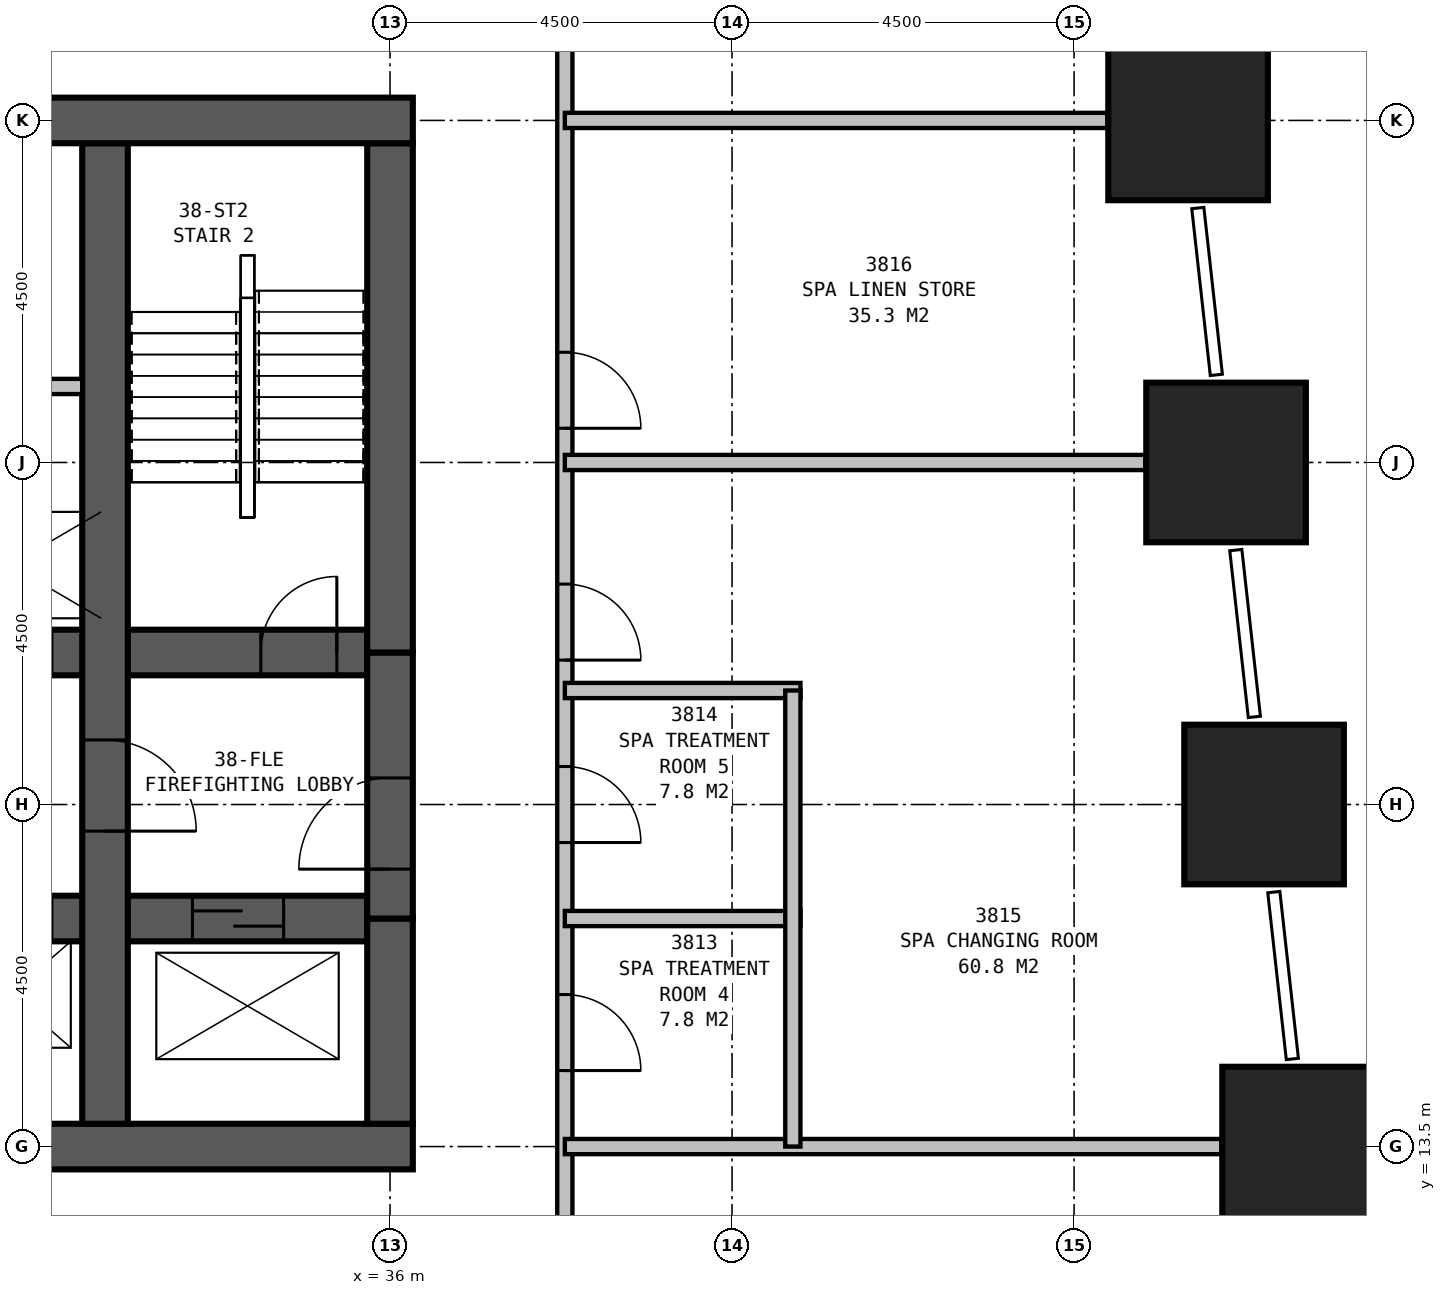
"""IFC4 building model, lengths in metres.
Left out: names, types, materials, properties, quantities, classifications, styles, units other than length and angle.
Written with IfcOpenShell. Run it as: python <this file> out.ifc"""

import sys

from ifc_helpers import new_model, si_unit, direction, frame, frame_2d, origin, origin_2d, place, context, subcontext, project, spatial, rectangle, extrude, element, fill, save


model = new_model("IFC4")
c1 = context("Model", 3, precision=1e-05, world=origin(), true_north=direction((0.0, 1.0)))
c2 = subcontext(c1, "Body", "Model", "MODEL_VIEW")
j1 = project(units=[si_unit("LENGTHUNIT", "METRE"), si_unit("PLANEANGLEUNIT", "RADIAN")], contexts=[c1])
p1 = place(None, origin())
s1 = spatial("IfcSite", under=j1, at=p1, CompositionType="ELEMENT")
p2 = place(p1, origin())
s2 = spatial("IfcBuilding", under=s1, at=p2, CompositionType="ELEMENT")
p3 = place(p2, frame((0.0, 0.0, 145.9)))
s3 = spatial("IfcBuildingStorey", under=s2, at=p3, CompositionType="ELEMENT", Elevation=145.9)
for number, where, z_axis, x_axis in (
    (1, (48.0, 13.5, 0.0), (0.0, 0.0, 1.0), (1.0, 0.0, 0.0)),
    (2, (47.5, 18.0, 0.0), (0.0, 0.0, 1.0), (1.0, 0.0, 0.0)),
    (3, (47.0, 22.5, 0.0), (0.0, 0.0, 1.0), (1.0, 0.0, 0.0)),
    (4, (46.5, 27.0, 0.0), (0.0, 0.0, 1.0), (1.0, 0.0, 0.0)),
):
    element("IfcColumn", number, at=place(p3, frame(where, z_axis=z_axis, x_axis=x_axis)), inside=s3, PredefinedType="COLUMN", context=c2, shape_type="SweptSolid", body=[
        extrude(rectangle(XDim=2.1, YDim=2.1, at=origin_2d()), origin(), (0.0, 0.0, 1.0), 6.0),
    ])
p4 = place(p3, frame((13.2, 13.5, 0.0), z_axis=(0.0, 0.0, 1.0), x_axis=(1.0, 0.0, 0.0)))
e5 = element("IfcWall", 5, at=p4, inside=s3, PredefinedType="SHEAR", context=c2, shape_type="SweptSolid", body=[
    extrude(rectangle(XDim=23.1, YDim=0.6, at=frame_2d((11.55, 0.0))), origin(), (0.0, 0.0, 1.0), 6.0),
])
p5 = place(p3, frame((36.3, 27.0, 0.0), z_axis=(0.0, 0.0, 1.0), x_axis=(-1.0, 0.0, 0.0)))
e6 = element("IfcWall", 6, at=p5, inside=s3, PredefinedType="SHEAR", context=c2, shape_type="SweptSolid", body=[
    extrude(rectangle(XDim=23.1, YDim=0.6, at=frame_2d((11.55, 0.0))), origin(), (0.0, 0.0, 1.0), 6.0),
])
p6 = place(p5, frame((17.05, 0.0, 0.0)))
e7 = element("IfcOpeningElement", 7, at=p6, cuts=e6, PredefinedType="OPENING", context=c2, shape_type="SweptSolid", body=[
    extrude(rectangle(XDim=1.0, YDim=2.1, at=frame_2d((0.5, 1.05))), frame((0.0, 0.31, 0.0), z_axis=(0.0, -1.0, 0.0), x_axis=(1.0, 0.0, 0.0)), (0.0, 0.0, 1.0), 0.62),
])
p7 = place(p5, frame((12.05, 0.0, 0.0)))
e8 = element("IfcOpeningElement", 8, at=p7, cuts=e6, PredefinedType="OPENING", context=c2, shape_type="SweptSolid", body=[
    extrude(rectangle(XDim=1.0, YDim=2.1, at=frame_2d((0.5, 1.05))), frame((0.0, 0.31, 0.0), z_axis=(0.0, -1.0, 0.0), x_axis=(1.0, 0.0, 0.0)), (0.0, 0.0, 1.0), 0.62),
])
p8 = place(p5, frame((7.05, 0.0, 0.0)))
e9 = element("IfcOpeningElement", 9, at=p8, cuts=e6, PredefinedType="OPENING", context=c2, shape_type="SweptSolid", body=[
    extrude(rectangle(XDim=1.0, YDim=2.1, at=frame_2d((0.5, 1.05))), frame((0.0, 0.31, 0.0), z_axis=(0.0, -1.0, 0.0), x_axis=(1.0, 0.0, 0.0)), (0.0, 0.0, 1.0), 0.62),
])
p9 = place(p3, frame((32.25, 13.8, 0.0), z_axis=(0.0, 0.0, 1.0), x_axis=(0.0, 1.0, 0.0)))
e10 = element("IfcWall", 10, at=p9, inside=s3, PredefinedType="SHEAR", context=c2, shape_type="SweptSolid", body=[
    extrude(rectangle(XDim=12.9, YDim=0.6, at=frame_2d((6.45, 0.0))), origin(), (0.0, 0.0, 1.0), 6.0),
])
p10 = place(p9, frame((5.05, 0.0, 0.0), z_axis=(0.0, 0.0, 1.0), x_axis=(-1.0, 0.0, 0.0)))
e11 = element("IfcOpeningElement", 11, at=p10, cuts=e10, PredefinedType="OPENING", context=c2, shape_type="SweptSolid", body=[
    extrude(rectangle(XDim=1.2, YDim=2.1, at=frame_2d((0.6, 1.05))), frame((0.0, 0.31, 0.0), z_axis=(0.0, -1.0, 0.0), x_axis=(1.0, 0.0, 0.0)), (0.0, 0.0, 1.0), 0.62),
])
p11 = place(p3, frame((13.8, 16.5, 0.0), z_axis=(0.0, 0.0, 1.0), x_axis=(1.0, 0.0, 0.0)))
e12 = element("IfcWall", 12, at=p11, inside=s3, PredefinedType="SHEAR", context=c2, shape_type="SweptSolid", body=[
    extrude(rectangle(XDim=21.9, YDim=0.6, at=frame_2d((10.95, 0.0))), origin(), (0.0, 0.0, 1.0), 6.0),
])
p12 = place(p11, frame((11.65, 0.0, 0.0)))
e13 = element("IfcOpeningElement", 13, at=p12, cuts=e12, PredefinedType="OPENING", context=c2, shape_type="SweptSolid", body=[
    extrude(rectangle(XDim=1.1, YDim=2.1, at=frame_2d((0.55, 1.05))), frame((0.0, 0.31, 0.0), z_axis=(0.0, -1.0, 0.0), x_axis=(1.0, 0.0, 0.0)), (0.0, 0.0, 1.0), 0.62),
])
p13 = place(p11, frame((14.15, 0.0, 0.0)))
e14 = element("IfcOpeningElement", 14, at=p13, cuts=e12, PredefinedType="OPENING", context=c2, shape_type="SweptSolid", body=[
    extrude(rectangle(XDim=1.1, YDim=2.1, at=frame_2d((0.55, 1.05))), frame((0.0, 0.31, 0.0), z_axis=(0.0, -1.0, 0.0), x_axis=(1.0, 0.0, 0.0)), (0.0, 0.0, 1.0), 0.62),
])
p14 = place(p11, frame((16.65, 0.0, 0.0)))
e15 = element("IfcOpeningElement", 15, at=p14, cuts=e12, PredefinedType="OPENING", context=c2, shape_type="SweptSolid", body=[
    extrude(rectangle(XDim=1.1, YDim=2.1, at=frame_2d((0.55, 1.05))), frame((0.0, 0.31, 0.0), z_axis=(0.0, -1.0, 0.0), x_axis=(1.0, 0.0, 0.0)), (0.0, 0.0, 1.0), 0.62),
])
p15 = place(p11, frame((5.75, 0.0, 0.0), z_axis=(0.0, 0.0, 1.0), x_axis=(-1.0, 0.0, 0.0)))
e16 = element("IfcOpeningElement", 16, at=p15, cuts=e12, PredefinedType="OPENING", context=c2, shape_type="SweptSolid", body=[
    extrude(rectangle(XDim=1.0, YDim=2.1, at=frame_2d((0.5, 1.05))), frame((0.0, 0.31, 0.0), z_axis=(0.0, -1.0, 0.0), x_axis=(1.0, 0.0, 0.0)), (0.0, 0.0, 1.0), 0.62),
])
p16 = place(p11, frame((10.2, 0.0, 0.0), z_axis=(0.0, 0.0, 1.0), x_axis=(-1.0, 0.0, 0.0)))
e17 = element("IfcOpeningElement", 17, at=p16, cuts=e12, PredefinedType="OPENING", context=c2, shape_type="SweptSolid", body=[
    extrude(rectangle(XDim=1.0, YDim=2.1, at=frame_2d((0.5, 1.05))), frame((0.0, 0.31, 0.0), z_axis=(0.0, -1.0, 0.0), x_axis=(1.0, 0.0, 0.0)), (0.0, 0.0, 1.0), 0.62),
])
p17 = place(p11, frame((0.6, 0.0, 0.0)))
e18 = element("IfcOpeningElement", 18, at=p17, cuts=e12, PredefinedType="OPENING", context=c2, shape_type="SweptSolid", body=[
    extrude(rectangle(XDim=1.2, YDim=2.1, at=frame_2d((0.6, 1.05))), frame((0.0, 0.31, 0.0), z_axis=(0.0, -1.0, 0.0), x_axis=(1.0, 0.0, 0.0)), (0.0, 0.0, 1.0), 0.62),
])
p18 = place(p11, frame((19.6, 0.0, 0.0)))
e19 = element("IfcOpeningElement", 19, at=p18, cuts=e12, PredefinedType="OPENING", context=c2, shape_type="SweptSolid", body=[
    extrude(rectangle(XDim=1.2, YDim=2.1, at=frame_2d((0.6, 1.05))), frame((0.0, 0.31, 0.0), z_axis=(0.0, -1.0, 0.0), x_axis=(1.0, 0.0, 0.0)), (0.0, 0.0, 1.0), 0.62),
])
p19 = place(p3, frame((13.8, 20.0, 0.0), z_axis=(0.0, 0.0, 1.0), x_axis=(1.0, 0.0, 0.0)))
e20 = element("IfcWall", 20, at=p19, inside=s3, PredefinedType="SHEAR", context=c2, shape_type="SweptSolid", body=[
    extrude(rectangle(XDim=21.9, YDim=0.6, at=frame_2d((10.95, 0.0))), origin(), (0.0, 0.0, 1.0), 6.0),
])
p20 = place(p19, frame((0.5, 0.0, 0.0)))
e21 = element("IfcOpeningElement", 21, at=p20, cuts=e20, PredefinedType="OPENING", context=c2, shape_type="SweptSolid", body=[
    extrude(rectangle(XDim=1.0, YDim=2.1, at=frame_2d((0.5, 1.05))), frame((0.0, 0.31, 0.0), z_axis=(0.0, -1.0, 0.0), x_axis=(1.0, 0.0, 0.0)), (0.0, 0.0, 1.0), 0.62),
])
p21 = place(p19, frame((20.5, 0.0, 0.0)))
e22 = element("IfcOpeningElement", 22, at=p21, cuts=e20, PredefinedType="OPENING", context=c2, shape_type="SweptSolid", body=[
    extrude(rectangle(XDim=1.0, YDim=2.1, at=frame_2d((0.5, 1.05))), frame((0.0, 0.31, 0.0), z_axis=(0.0, -1.0, 0.0), x_axis=(1.0, 0.0, 0.0)), (0.0, 0.0, 1.0), 0.62),
])
p22 = place(p19, frame((4.15, 0.0, 0.0)))
e23 = element("IfcOpeningElement", 23, at=p22, cuts=e20, PredefinedType="OPENING", context=c2, shape_type="SweptSolid", body=[
    extrude(rectangle(XDim=1.1, YDim=2.1, at=frame_2d((0.55, 1.05))), frame((0.0, 0.31, 0.0), z_axis=(0.0, -1.0, 0.0), x_axis=(1.0, 0.0, 0.0)), (0.0, 0.0, 1.0), 0.62),
])
p23 = place(p19, frame((6.65, 0.0, 0.0)))
e24 = element("IfcOpeningElement", 24, at=p23, cuts=e20, PredefinedType="OPENING", context=c2, shape_type="SweptSolid", body=[
    extrude(rectangle(XDim=1.1, YDim=2.1, at=frame_2d((0.55, 1.05))), frame((0.0, 0.31, 0.0), z_axis=(0.0, -1.0, 0.0), x_axis=(1.0, 0.0, 0.0)), (0.0, 0.0, 1.0), 0.62),
])
p24 = place(p19, frame((9.15, 0.0, 0.0)))
e25 = element("IfcOpeningElement", 25, at=p24, cuts=e20, PredefinedType="OPENING", context=c2, shape_type="SweptSolid", body=[
    extrude(rectangle(XDim=1.1, YDim=2.1, at=frame_2d((0.55, 1.05))), frame((0.0, 0.31, 0.0), z_axis=(0.0, -1.0, 0.0), x_axis=(1.0, 0.0, 0.0)), (0.0, 0.0, 1.0), 0.62),
])
p25 = place(p19, frame((11.65, 0.0, 0.0)))
e26 = element("IfcOpeningElement", 26, at=p25, cuts=e20, PredefinedType="OPENING", context=c2, shape_type="SweptSolid", body=[
    extrude(rectangle(XDim=1.1, YDim=2.1, at=frame_2d((0.55, 1.05))), frame((0.0, 0.31, 0.0), z_axis=(0.0, -1.0, 0.0), x_axis=(1.0, 0.0, 0.0)), (0.0, 0.0, 1.0), 0.62),
])
p26 = place(p19, frame((14.15, 0.0, 0.0)))
e27 = element("IfcOpeningElement", 27, at=p26, cuts=e20, PredefinedType="OPENING", context=c2, shape_type="SweptSolid", body=[
    extrude(rectangle(XDim=1.1, YDim=2.1, at=frame_2d((0.55, 1.05))), frame((0.0, 0.31, 0.0), z_axis=(0.0, -1.0, 0.0), x_axis=(1.0, 0.0, 0.0)), (0.0, 0.0, 1.0), 0.62),
])
p27 = place(p19, frame((16.65, 0.0, 0.0)))
e28 = element("IfcOpeningElement", 28, at=p27, cuts=e20, PredefinedType="OPENING", context=c2, shape_type="SweptSolid", body=[
    extrude(rectangle(XDim=1.1, YDim=2.1, at=frame_2d((0.55, 1.05))), frame((0.0, 0.31, 0.0), z_axis=(0.0, -1.0, 0.0), x_axis=(1.0, 0.0, 0.0)), (0.0, 0.0, 1.0), 0.62),
])
p28 = place(p3, frame((36.0, 13.8, 0.0), z_axis=(0.0, 0.0, 1.0), x_axis=(0.0, 1.0, 0.0)))
e29 = element("IfcWall", 29, at=p28, inside=s3, PredefinedType="SHEAR", context=c2, shape_type="SweptSolid", body=[
    extrude(rectangle(XDim=2.7, YDim=0.6, at=frame_2d((1.35, 0.0))), origin(), (0.0, 0.0, 1.0), 6.0),
])
p29 = place(p3, frame((36.0, 16.5, 0.0), z_axis=(0.0, 0.0, 1.0), x_axis=(0.0, 1.0, 0.0)))
e30 = element("IfcWall", 30, at=p29, inside=s3, PredefinedType="SHEAR", context=c2, shape_type="SweptSolid", body=[
    extrude(rectangle(XDim=3.5, YDim=0.6, at=frame_2d((1.75, 0.0))), origin(), (0.0, 0.0, 1.0), 6.0),
])
p30 = place(p29, frame((0.65, 0.0, 0.0)))
e31 = element("IfcOpeningElement", 31, at=p30, cuts=e30, PredefinedType="OPENING", context=c2, shape_type="SweptSolid", body=[
    extrude(rectangle(XDim=1.2, YDim=2.1, at=frame_2d((0.6, 1.05))), frame((0.0, 0.31, 0.0), z_axis=(0.0, -1.0, 0.0), x_axis=(1.0, 0.0, 0.0)), (0.0, 0.0, 1.0), 0.62),
])
p31 = place(p3, frame((36.0, 20.0, 0.0), z_axis=(0.0, 0.0, 1.0), x_axis=(0.0, 1.0, 0.0)))
e32 = element("IfcWall", 32, at=p31, inside=s3, PredefinedType="SHEAR", context=c2, shape_type="SweptSolid", body=[
    extrude(rectangle(XDim=6.7, YDim=0.6, at=frame_2d((3.35, 0.0))), origin(), (0.0, 0.0, 1.0), 6.0),
])
p32 = place(p3, frame((38.3, 11.2, 0.0), z_axis=(0.0, 0.0, 1.0), x_axis=(0.0, 1.0, 0.0)))
e33 = element("IfcWall", 33, at=p32, inside=s3, PredefinedType="PARTITIONING", context=c2, shape_type="SweptSolid", body=[
    extrude(rectangle(XDim=18.1, YDim=0.2, at=frame_2d((9.05, 0.0))), origin(), (0.0, 0.0, 1.0), 5.7),
])
p33 = place(p32, frame((4.3, 0.0, 0.0), z_axis=(0.0, 0.0, 1.0), x_axis=(-1.0, 0.0, 0.0)))
e34 = element("IfcOpeningElement", 34, at=p33, cuts=e33, PredefinedType="OPENING", context=c2, shape_type="SweptSolid", body=[
    extrude(rectangle(XDim=1.0, YDim=2.1, at=frame_2d((0.5, 1.05))), frame((0.0, 0.11, 0.0), z_axis=(0.0, -1.0, 0.0), x_axis=(1.0, 0.0, 0.0)), (0.0, 0.0, 1.0), 0.22),
])
p34 = place(p32, frame((7.3, 0.0, 0.0), z_axis=(0.0, 0.0, 1.0), x_axis=(-1.0, 0.0, 0.0)))
e35 = element("IfcOpeningElement", 35, at=p34, cuts=e33, PredefinedType="OPENING", context=c2, shape_type="SweptSolid", body=[
    extrude(rectangle(XDim=1.0, YDim=2.1, at=frame_2d((0.5, 1.05))), frame((0.0, 0.11, 0.0), z_axis=(0.0, -1.0, 0.0), x_axis=(1.0, 0.0, 0.0)), (0.0, 0.0, 1.0), 0.22),
])
p35 = place(p32, frame((9.7, 0.0, 0.0), z_axis=(0.0, 0.0, 1.0), x_axis=(-1.0, 0.0, 0.0)))
e36 = element("IfcOpeningElement", 36, at=p35, cuts=e33, PredefinedType="OPENING", context=c2, shape_type="SweptSolid", body=[
    extrude(rectangle(XDim=1.0, YDim=2.1, at=frame_2d((0.5, 1.05))), frame((0.0, 0.11, 0.0), z_axis=(0.0, -1.0, 0.0), x_axis=(1.0, 0.0, 0.0)), (0.0, 0.0, 1.0), 0.22),
])
p36 = place(p32, frame((12.75, 0.0, 0.0), z_axis=(0.0, 0.0, 1.0), x_axis=(-1.0, 0.0, 0.0)))
e37 = element("IfcOpeningElement", 37, at=p36, cuts=e33, PredefinedType="OPENING", context=c2, shape_type="SweptSolid", body=[
    extrude(rectangle(XDim=1.0, YDim=2.1, at=frame_2d((0.5, 1.05))), frame((0.0, 0.11, 0.0), z_axis=(0.0, -1.0, 0.0), x_axis=(1.0, 0.0, 0.0)), (0.0, 0.0, 1.0), 0.22),
])
p37 = place(p3, frame((38.3, 13.5, 0.0), z_axis=(0.0, 0.0, 1.0), x_axis=(1.0, 0.0, 0.0)))
e38 = element("IfcWall", 38, at=p37, inside=s3, PredefinedType="PARTITIONING", context=c2, shape_type="SweptSolid", body=[
    extrude(rectangle(XDim=8.639, YDim=0.2, at=frame_2d((4.32, 0.0))), origin(), (0.0, 0.0, 1.0), 4.4),
])
p38 = place(p3, frame((38.3, 22.5, 0.0), z_axis=(0.0, 0.0, 1.0), x_axis=(1.0, 0.0, 0.0)))
e39 = element("IfcWall", 39, at=p38, inside=s3, PredefinedType="PARTITIONING", context=c2, shape_type="SweptSolid", body=[
    extrude(rectangle(XDim=7.639, YDim=0.2, at=frame_2d((3.82, 0.0))), origin(), (0.0, 0.0, 1.0), 4.7),
])
p39 = place(p3, frame((38.3, 27.0, 0.0), z_axis=(0.0, 0.0, 1.0), x_axis=(1.0, 0.0, 0.0)))
e40 = element("IfcWall", 40, at=p39, inside=s3, PredefinedType="PARTITIONING", context=c2, shape_type="SweptSolid", body=[
    extrude(rectangle(XDim=7.139, YDim=0.2, at=frame_2d((3.57, 0.0))), origin(), (0.0, 0.0, 1.0), 4.4),
])
for number, where, z_axis, x_axis in (
    (41, (38.3, 16.5, 0.0), (0.0, 0.0, 1.0), (1.0, 0.0, 0.0)),
    (42, (38.3, 19.5, 0.0), (0.0, 0.0, 1.0), (1.0, 0.0, 0.0)),
):
    element("IfcWall", number, at=place(p3, frame(where, z_axis=z_axis, x_axis=x_axis)), inside=s3, PredefinedType="PARTITIONING", context=c2, shape_type="SweptSolid", body=[
        extrude(rectangle(XDim=3.1, YDim=0.2, at=frame_2d((1.55, 0.0))), origin(), (0.0, 0.0, 1.0), 5.7),
    ])
p40 = place(p3, frame((41.3, 13.5, 0.0), z_axis=(0.0, 0.0, 1.0), x_axis=(0.0, 1.0, 0.0)))
e43 = element("IfcWall", 43, at=p40, inside=s3, PredefinedType="PARTITIONING", context=c2, shape_type="SweptSolid", body=[
    extrude(rectangle(XDim=6.0, YDim=0.2, at=frame_2d((3.0, 0.0))), origin(), (0.0, 0.0, 1.0), 5.7),
])
p41 = place(p3, frame((17.55, 23.5, 0.0), z_axis=(0.0, 0.0, 1.0), x_axis=(1.0, 0.0, 0.0)))
e44 = element("IfcWall", 44, at=p41, inside=s3, PredefinedType="PARTITIONING", context=c2, shape_type="SweptSolid", body=[
    extrude(rectangle(XDim=14.4, YDim=0.2, at=frame_2d((7.2, 0.0))), origin(), (0.0, 0.0, 1.0), 5.7),
])
p42 = place(p33, origin())
e45 = element("IfcDoor", 45, at=p42, inside=s3, OperationType="SINGLE_SWING_RIGHT", PredefinedType="DOOR", context=c2, shape_type="SweptSolid", body=[
    extrude(rectangle(XDim=1.0, YDim=2.1, at=frame_2d((0.5, 1.05))), frame((0.0, 0.025, 0.0), z_axis=(0.0, -1.0, 0.0), x_axis=(1.0, 0.0, 0.0)), (0.0, 0.0, 1.0), 0.05),
])
fill(e34, e45)
p43 = place(p34, origin())
e46 = element("IfcDoor", 46, at=p43, inside=s3, OperationType="SINGLE_SWING_RIGHT", PredefinedType="DOOR", context=c2, shape_type="SweptSolid", body=[
    extrude(rectangle(XDim=1.0, YDim=2.1, at=frame_2d((0.5, 1.05))), frame((0.0, 0.025, 0.0), z_axis=(0.0, -1.0, 0.0), x_axis=(1.0, 0.0, 0.0)), (0.0, 0.0, 1.0), 0.05),
])
fill(e35, e46)
p44 = place(p35, origin())
e47 = element("IfcDoor", 47, at=p44, inside=s3, OperationType="SINGLE_SWING_RIGHT", PredefinedType="DOOR", context=c2, shape_type="SweptSolid", body=[
    extrude(rectangle(XDim=1.0, YDim=2.1, at=frame_2d((0.5, 1.05))), frame((0.0, 0.025, 0.0), z_axis=(0.0, -1.0, 0.0), x_axis=(1.0, 0.0, 0.0)), (0.0, 0.0, 1.0), 0.05),
])
fill(e36, e47)
p45 = place(p36, origin())
e48 = element("IfcDoor", 48, at=p45, inside=s3, OperationType="SINGLE_SWING_RIGHT", PredefinedType="DOOR", context=c2, shape_type="SweptSolid", body=[
    extrude(rectangle(XDim=1.0, YDim=2.1, at=frame_2d((0.5, 1.05))), frame((0.0, 0.025, 0.0), z_axis=(0.0, -1.0, 0.0), x_axis=(1.0, 0.0, 0.0)), (0.0, 0.0, 1.0), 0.05),
])
fill(e37, e48)
p46 = place(p30, origin())
e49 = element("IfcDoor", 49, at=p46, inside=s3, OperationType="SINGLE_SWING_LEFT", PredefinedType="DOOR", context=c2, shape_type="SweptSolid", body=[
    extrude(rectangle(XDim=1.2, YDim=2.1, at=frame_2d((0.6, 1.05))), frame((0.0, 0.3, 0.0), z_axis=(0.0, -1.0, 0.0), x_axis=(1.0, 0.0, 0.0)), (0.0, 0.0, 1.0), 0.6),
])
fill(e31, e49)
p47 = place(p10, origin())
e50 = element("IfcDoor", 50, at=p47, inside=s3, OperationType="SINGLE_SWING_RIGHT", PredefinedType="DOOR", context=c2, shape_type="SweptSolid", body=[
    extrude(rectangle(XDim=1.2, YDim=2.1, at=frame_2d((0.6, 1.05))), frame((0.0, 0.3, 0.0), z_axis=(0.0, -1.0, 0.0), x_axis=(1.0, 0.0, 0.0)), (0.0, 0.0, 1.0), 0.6),
])
fill(e11, e50)
p48 = place(p21, origin())
e51 = element("IfcDoor", 51, at=p48, inside=s3, OperationType="SINGLE_SWING_RIGHT", PredefinedType="DOOR", context=c2, shape_type="SweptSolid", body=[
    extrude(rectangle(XDim=1.0, YDim=2.1, at=frame_2d((0.5, 1.05))), frame((0.0, 0.3, 0.0), z_axis=(0.0, -1.0, 0.0), x_axis=(1.0, 0.0, 0.0)), (0.0, 0.0, 1.0), 0.6),
])
fill(e22, e51)
p49 = place(p18, origin())
e52 = element("IfcDoor", 52, at=p49, inside=s3, OperationType="SLIDING_TO_LEFT", PredefinedType="DOOR", context=c2, shape_type="SweptSolid", body=[
    extrude(rectangle(XDim=1.2, YDim=2.1, at=frame_2d((0.6, 1.05))), frame((0.0, 0.3, 0.0), z_axis=(0.0, -1.0, 0.0), x_axis=(1.0, 0.0, 0.0)), (0.0, 0.0, 1.0), 0.6),
])
fill(e19, e52)
save(model, sys.argv[1])
